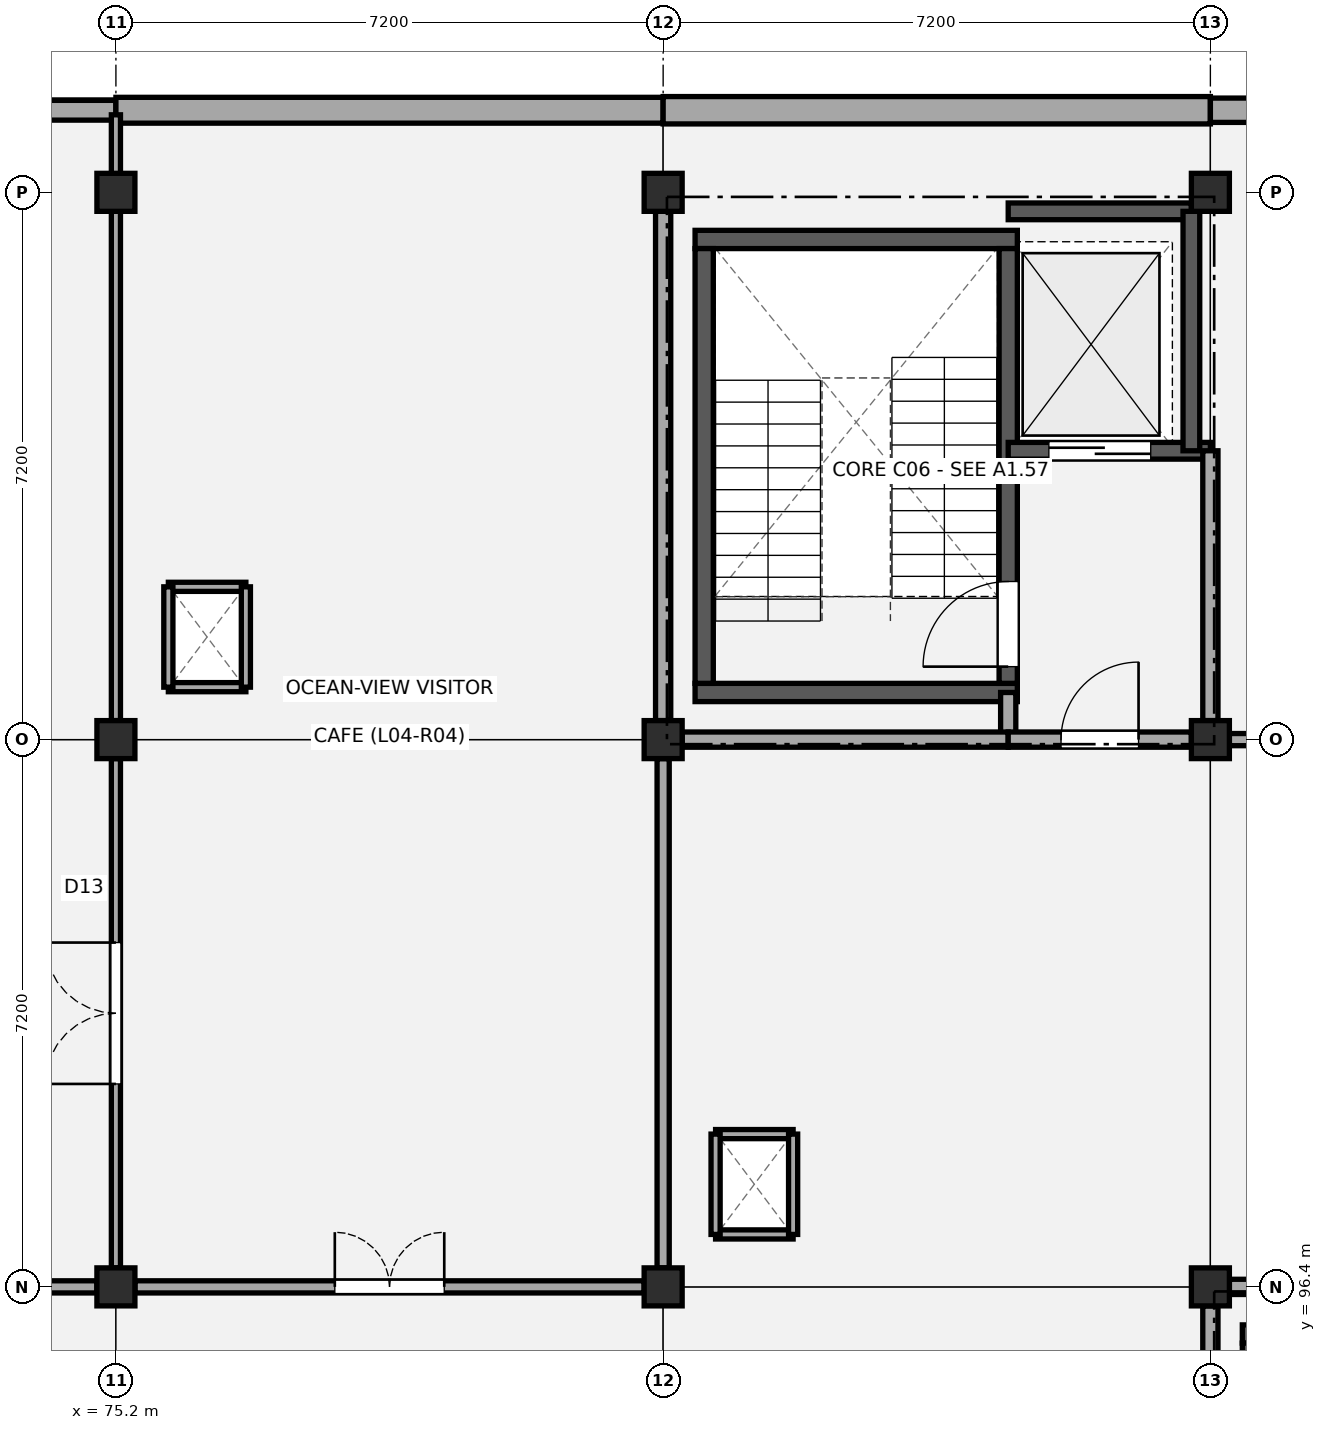
"""IFC4 building model, lengths in metres.
Left out: names, types, materials, properties, quantities, classifications, styles, units other than length and angle.
Written with IfcOpenShell. Run it as: python <this file> out.ifc"""

import sys

from ifc_helpers import new_model, si_unit, direction, frame, frame_2d, origin, origin_2d, place, context, subcontext, project, spatial, rectangle, extrude, element, fill, save


model = new_model("IFC4")
c1 = context("Model", 3, precision=1e-05, world=origin(), true_north=direction((0.0, 1.0)))
c2 = subcontext(c1, "Body", "Model", "MODEL_VIEW")
j1 = project(units=[si_unit("LENGTHUNIT", "METRE"), si_unit("PLANEANGLEUNIT", "RADIAN")], contexts=[c1])
p1 = place(None, origin())
s1 = spatial("IfcSite", under=j1, at=p1, CompositionType="ELEMENT")
p2 = place(p1, origin())
s2 = spatial("IfcBuilding", under=s1, at=p2, CompositionType="ELEMENT")
p3 = place(p2, frame((0.0, 0.0, 17.64)))
s3 = spatial("IfcBuildingStorey", under=s2, at=p3, CompositionType="ELEMENT", Elevation=17.64)
for number, where, z_axis, x_axis in (
    (1, (75.2, 96.4, 0.0), (0.0, 0.0, 1.0), (1.0, 0.0, 0.0)),
    (2, (75.2, 103.6, 0.0), (0.0, 0.0, 1.0), (1.0, 0.0, 0.0)),
    (3, (75.2, 110.8, 0.0), (0.0, 0.0, 1.0), (1.0, 0.0, 0.0)),
    (4, (82.4, 96.4, 0.0), (0.0, 0.0, 1.0), (1.0, 0.0, 0.0)),
    (5, (82.4, 103.6, 0.0), (0.0, 0.0, 1.0), (1.0, 0.0, 0.0)),
    (6, (82.4, 110.8, 0.0), (0.0, 0.0, 1.0), (1.0, 0.0, 0.0)),
    (7, (89.6, 96.4, 0.0), (0.0, 0.0, 1.0), (1.0, 0.0, 0.0)),
    (8, (89.6, 103.6, 0.0), (0.0, 0.0, 1.0), (1.0, 0.0, 0.0)),
    (9, (89.6, 110.8, 0.0), (0.0, 0.0, 1.0), (1.0, 0.0, 0.0)),
):
    element("IfcColumn", number, at=place(p3, frame(where, z_axis=z_axis, x_axis=x_axis)), inside=s3, PredefinedType="COLUMN", context=c2, shape_type="SweptSolid", body=[
        extrude(rectangle(XDim=0.5, YDim=0.5, at=origin_2d()), origin(), (0.0, 0.0, 1.0), 3.96),
    ])
p4 = place(p3, frame((68.0, 111.88, 0.0), z_axis=(0.0, 0.0, 1.0), x_axis=(1.0, 0.0, 0.0)))
e10 = element("IfcWall", 10, at=p4, inside=s3, PredefinedType="STANDARD", context=c2, shape_type="SweptSolid", body=[
    extrude(rectangle(XDim=7.2, YDim=0.26, at=frame_2d((3.6, 0.0))), origin(), (0.0, 0.0, 1.0), 3.63),
])
p5 = place(p4, frame((1.85, 0.0, 0.95)))
e11 = element("IfcOpeningElement", 11, at=p5, cuts=e10, PredefinedType="OPENING", context=c2, shape_type="SweptSolid", body=[
    extrude(rectangle(XDim=3.5, YDim=1.55, at=frame_2d((1.75, 0.775))), frame((0.0, 0.14, 0.0), z_axis=(0.0, -1.0, 0.0), x_axis=(1.0, 0.0, 0.0)), (0.0, 0.0, 1.0), 0.28),
])
p6 = place(p3, frame((75.2, 111.88, 0.0), z_axis=(0.0, 0.0, 1.0), x_axis=(1.0, 0.0, 0.0)))
e12 = element("IfcWall", 12, at=p6, inside=s3, PredefinedType="STANDARD", context=c2, shape_type="SweptSolid", body=[
    extrude(rectangle(XDim=7.2, YDim=0.34, at=frame_2d((3.6, 0.0))), origin(), (0.0, 0.0, 1.0), 3.63),
])
p7 = place(p3, frame((82.4, 111.88, 0.0), z_axis=(0.0, 0.0, 1.0), x_axis=(1.0, 0.0, 0.0)))
e13 = element("IfcWall", 13, at=p7, inside=s3, PredefinedType="STANDARD", context=c2, shape_type="SweptSolid", body=[
    extrude(rectangle(XDim=7.2, YDim=0.36, at=frame_2d((3.6, 0.0))), origin(), (0.0, 0.0, 1.0), 3.69),
])
p8 = place(p3, frame((89.6, 111.88, 0.0), z_axis=(0.0, 0.0, 1.0), x_axis=(1.0, 0.0, 0.0)))
e14 = element("IfcWall", 14, at=p8, inside=s3, PredefinedType="STANDARD", context=c2, shape_type="SweptSolid", body=[
    extrude(rectangle(XDim=7.2, YDim=0.32, at=frame_2d((3.6, 0.0))), origin(), (0.0, 0.0, 1.0), 3.67),
])
for number, where, z_axis, x_axis in (
    (15, (82.82, 104.22, 0.0), (0.0, 0.0, 1.0), (1.0, 0.0, 0.0)),
    (16, (82.82, 110.18, 0.0), (0.0, 0.0, 1.0), (1.0, 0.0, 0.0)),
):
    element("IfcWall", number, at=place(p3, frame(where, z_axis=z_axis, x_axis=x_axis)), inside=s3, PredefinedType="SHEAR", context=c2, shape_type="SweptSolid", body=[
        extrude(rectangle(XDim=4.24, YDim=0.24, at=frame_2d((2.12, 0.0))), origin(), (0.0, 0.0, 1.0), 3.7),
    ])
p9 = place(p3, frame((82.94, 104.34, 0.0), z_axis=(0.0, 0.0, 1.0), x_axis=(0.0, 1.0, 0.0)))
e17 = element("IfcWall", 17, at=p9, inside=s3, PredefinedType="SHEAR", context=c2, shape_type="SweptSolid", body=[
    extrude(rectangle(XDim=5.72, YDim=0.24, at=frame_2d((2.86, 0.0))), origin(), (0.0, 0.0, 1.0), 3.7),
])
p10 = place(p3, frame((86.94, 104.34, 0.0), z_axis=(0.0, 0.0, 1.0), x_axis=(0.0, 1.0, 0.0)))
e18 = element("IfcWall", 18, at=p10, inside=s3, PredefinedType="SHEAR", context=c2, shape_type="SweptSolid", body=[
    extrude(rectangle(XDim=5.72, YDim=0.24, at=frame_2d((2.86, 0.0))), origin(), (0.0, 0.0, 1.0), 3.7),
])
p11 = place(p10, frame((0.22, 0.0, 0.0)))
e19 = element("IfcOpeningElement", 19, at=p11, cuts=e18, PredefinedType="OPENING", context=c2, shape_type="SweptSolid", body=[
    extrude(rectangle(XDim=1.12, YDim=2.15, at=frame_2d((0.56, 1.075))), frame((0.0, 0.13, 0.0), z_axis=(0.0, -1.0, 0.0), x_axis=(1.0, 0.0, 0.0)), (0.0, 0.0, 1.0), 0.26),
])
p12 = place(p3, frame((86.94, 107.4, 0.0), z_axis=(0.0, 0.0, 1.0), x_axis=(1.0, 0.0, 0.0)))
e20 = element("IfcWall", 20, at=p12, inside=s3, PredefinedType="SHEAR", context=c2, shape_type="SweptSolid", body=[
    extrude(rectangle(XDim=2.66, YDim=0.22, at=frame_2d((1.33, 0.0))), origin(), (0.0, 0.0, 1.0), 3.7),
])
p13 = place(p12, frame((0.535, 0.0, 0.0)))
e21 = element("IfcOpeningElement", 21, at=p13, cuts=e20, PredefinedType="OPENING", context=c2, shape_type="SweptSolid", body=[
    extrude(rectangle(XDim=1.34, YDim=2.15, at=frame_2d((0.67, 1.075))), frame((0.0, 0.12, 0.0), z_axis=(0.0, -1.0, 0.0), x_axis=(1.0, 0.0, 0.0)), (0.0, 0.0, 1.0), 0.24),
])
p14 = place(p3, frame((86.94, 110.55, 0.0), z_axis=(0.0, 0.0, 1.0), x_axis=(1.0, 0.0, 0.0)))
e22 = element("IfcWall", 22, at=p14, inside=s3, PredefinedType="SHEAR", context=c2, shape_type="SweptSolid", body=[
    extrude(rectangle(XDim=2.41, YDim=0.22, at=frame_2d((1.205, 0.0))), origin(), (0.0, 0.0, 1.0), 3.7),
])
p15 = place(p3, frame((89.35, 107.4, 0.0), z_axis=(0.0, 0.0, 1.0), x_axis=(0.0, 1.0, 0.0)))
e23 = element("IfcWall", 23, at=p15, inside=s3, PredefinedType="SHEAR", context=c2, shape_type="SweptSolid", body=[
    extrude(rectangle(XDim=3.15, YDim=0.22, at=frame_2d((1.575, 0.0))), origin(), (0.0, 0.0, 1.0), 3.7),
])
p16 = place(p3, frame((86.94, 103.6, 0.0), z_axis=(0.0, 0.0, 1.0), x_axis=(0.0, 1.0, 0.0)))
e24 = element("IfcWall", 24, at=p16, inside=s3, PredefinedType="PARTITIONING", context=c2, shape_type="SweptSolid", body=[
    extrude(rectangle(XDim=0.62, YDim=0.2, at=frame_2d((0.31, 0.0))), origin(), (0.0, 0.0, 1.0), 3.09),
])
p17 = place(p3, frame((82.4, 103.85, 0.0), z_axis=(0.0, 0.0, 1.0), x_axis=(0.0, 1.0, 0.0)))
e25 = element("IfcWall", 25, at=p17, inside=s3, PredefinedType="PARTITIONING", context=c2, shape_type="SweptSolid", body=[
    extrude(rectangle(XDim=6.7, YDim=0.2, at=frame_2d((3.35, 0.0))), origin(), (0.0, 0.0, 1.0), 2.98),
])
p18 = place(p3, frame((89.6, 103.85, 0.0), z_axis=(0.0, 0.0, 1.0), x_axis=(0.0, 1.0, 0.0)))
e26 = element("IfcWall", 26, at=p18, inside=s3, PredefinedType="PARTITIONING", context=c2, shape_type="SweptSolid", body=[
    extrude(rectangle(XDim=3.55, YDim=0.2, at=frame_2d((1.775, 0.0))), origin(), (0.0, 0.0, 1.0), 3.02),
])
p19 = place(p3, frame((82.65, 103.6, 0.0), z_axis=(0.0, 0.0, 1.0), x_axis=(1.0, 0.0, 0.0)))
e27 = element("IfcWall", 27, at=p19, inside=s3, PredefinedType="PARTITIONING", context=c2, shape_type="SweptSolid", body=[
    extrude(rectangle(XDim=4.29, YDim=0.2, at=frame_2d((2.145, 0.0))), origin(), (0.0, 0.0, 1.0), 3.09),
])
p20 = place(p3, frame((86.94, 103.6, 0.0), z_axis=(0.0, 0.0, 1.0), x_axis=(1.0, 0.0, 0.0)))
e28 = element("IfcWall", 28, at=p20, inside=s3, PredefinedType="PARTITIONING", context=c2, shape_type="SweptSolid", body=[
    extrude(rectangle(XDim=2.41, YDim=0.2, at=frame_2d((1.205, 0.0))), origin(), (0.0, 0.0, 1.0), 3.09),
])
p21 = place(p20, frame((0.695, 0.0, 0.0)))
e29 = element("IfcOpeningElement", 29, at=p21, cuts=e28, PredefinedType="OPENING", context=c2, shape_type="SweptSolid", body=[
    extrude(rectangle(XDim=1.02, YDim=2.15, at=frame_2d((0.51, 1.075))), frame((0.0, 0.11, 0.0), z_axis=(0.0, -1.0, 0.0), x_axis=(1.0, 0.0, 0.0)), (0.0, 0.0, 1.0), 0.22),
])
p22 = place(p3, frame((90.02, 95.78, 0.0), z_axis=(0.0, 0.0, 1.0), x_axis=(1.0, 0.0, 0.0)))
e30 = element("IfcWall", 30, at=p22, inside=s3, PredefinedType="SHEAR", context=c2, shape_type="SweptSolid", body=[
    extrude(rectangle(XDim=4.24, YDim=0.24, at=frame_2d((2.12, 0.0))), origin(), (0.0, 0.0, 1.0), 3.68),
])
p23 = place(p3, frame((90.14, 89.94, 0.0), z_axis=(0.0, 0.0, 1.0), x_axis=(0.0, 1.0, 0.0)))
e31 = element("IfcWall", 31, at=p23, inside=s3, PredefinedType="SHEAR", context=c2, shape_type="SweptSolid", body=[
    extrude(rectangle(XDim=5.72, YDim=0.24, at=frame_2d((2.86, 0.0))), origin(), (0.0, 0.0, 1.0), 3.68),
])
p24 = place(p3, frame((89.6, 89.45, 0.0), z_axis=(0.0, 0.0, 1.0), x_axis=(0.0, 1.0, 0.0)))
e32 = element("IfcWall", 32, at=p24, inside=s3, PredefinedType="PARTITIONING", context=c2, shape_type="SweptSolid", body=[
    extrude(rectangle(XDim=6.7, YDim=0.2, at=frame_2d((3.35, 0.0))), origin(), (0.0, 0.0, 1.0), 3.02),
])
p25 = place(p3, frame((89.85, 96.4, 0.0), z_axis=(0.0, 0.0, 1.0), x_axis=(1.0, 0.0, 0.0)))
e33 = element("IfcWall", 33, at=p25, inside=s3, PredefinedType="PARTITIONING", context=c2, shape_type="SweptSolid", body=[
    extrude(rectangle(XDim=6.7, YDim=0.2, at=frame_2d((3.35, 0.0))), origin(), (0.0, 0.0, 1.0), 3.07),
])
for number, where, z_axis, x_axis in (
    (34, (75.89, 104.29, 0.0), (0.0, 0.0, 1.0), (1.0, 0.0, 0.0)),
    (35, (75.89, 105.61, 0.0), (0.0, 0.0, 1.0), (1.0, 0.0, 0.0)),
):
    element("IfcWall", number, at=place(p3, frame(where, z_axis=z_axis, x_axis=x_axis)), inside=s3, PredefinedType="PARTITIONING", context=c2, shape_type="SweptSolid", body=[
        extrude(rectangle(XDim=1.02, YDim=0.12, at=frame_2d((0.51, 0.0))), origin(), (0.0, 0.0, 1.0), 3.62),
    ])
for number, where, z_axis, x_axis in (
    (36, (75.89, 104.29, 0.0), (0.0, 0.0, 1.0), (0.0, 1.0, 0.0)),
    (37, (76.91, 104.29, 0.0), (0.0, 0.0, 1.0), (0.0, 1.0, 0.0)),
):
    element("IfcWall", number, at=place(p3, frame(where, z_axis=z_axis, x_axis=x_axis)), inside=s3, PredefinedType="PARTITIONING", context=c2, shape_type="SweptSolid", body=[
        extrude(rectangle(XDim=1.32, YDim=0.12, at=frame_2d((0.66, 0.0))), origin(), (0.0, 0.0, 1.0), 3.62),
    ])
for number, where, z_axis, x_axis in (
    (38, (83.09, 97.09, 0.0), (0.0, 0.0, 1.0), (1.0, 0.0, 0.0)),
    (39, (83.09, 98.41, 0.0), (0.0, 0.0, 1.0), (1.0, 0.0, 0.0)),
):
    element("IfcWall", number, at=place(p3, frame(where, z_axis=z_axis, x_axis=x_axis)), inside=s3, PredefinedType="PARTITIONING", context=c2, shape_type="SweptSolid", body=[
        extrude(rectangle(XDim=1.02, YDim=0.12, at=frame_2d((0.51, 0.0))), origin(), (0.0, 0.0, 1.0), 3.68),
    ])
for number, where, z_axis, x_axis in (
    (40, (83.09, 97.09, 0.0), (0.0, 0.0, 1.0), (0.0, 1.0, 0.0)),
    (41, (84.11, 97.09, 0.0), (0.0, 0.0, 1.0), (0.0, 1.0, 0.0)),
):
    element("IfcWall", number, at=place(p3, frame(where, z_axis=z_axis, x_axis=x_axis)), inside=s3, PredefinedType="PARTITIONING", context=c2, shape_type="SweptSolid", body=[
        extrude(rectangle(XDim=1.32, YDim=0.12, at=frame_2d((0.66, 0.0))), origin(), (0.0, 0.0, 1.0), 3.68),
    ])
p26 = place(p3, frame((68.25, 96.4, 0.0), z_axis=(0.0, 0.0, 1.0), x_axis=(1.0, 0.0, 0.0)))
e42 = element("IfcWall", 42, at=p26, inside=s3, PredefinedType="PARTITIONING", context=c2, shape_type="SweptSolid", body=[
    extrude(rectangle(XDim=6.7, YDim=0.16, at=frame_2d((3.35, 0.0))), origin(), (0.0, 0.0, 1.0), 2.98),
])
p27 = place(p26, frame((2.63, 0.0, 0.0)))
e43 = element("IfcOpeningElement", 43, at=p27, cuts=e42, PredefinedType="OPENING", context=c2, shape_type="SweptSolid", body=[
    extrude(rectangle(XDim=1.44, YDim=2.2, at=frame_2d((0.72, 1.1))), frame((0.0, 0.09, 0.0), z_axis=(0.0, -1.0, 0.0), x_axis=(1.0, 0.0, 0.0)), (0.0, 0.0, 1.0), 0.18),
])
p28 = place(p3, frame((75.2, 96.65, 0.0), z_axis=(0.0, 0.0, 1.0), x_axis=(0.0, 1.0, 0.0)))
e44 = element("IfcWall", 44, at=p28, inside=s3, PredefinedType="PARTITIONING", context=c2, shape_type="SweptSolid", body=[
    extrude(rectangle(XDim=6.7, YDim=0.12, at=frame_2d((3.35, 0.0))), origin(), (0.0, 0.0, 1.0), 3.03),
])
p29 = place(p28, frame((2.42, 0.0, 0.0)))
e45 = element("IfcOpeningElement", 45, at=p29, cuts=e44, PredefinedType="OPENING", context=c2, shape_type="SweptSolid", body=[
    extrude(rectangle(XDim=1.86, YDim=2.26, at=frame_2d((0.93, 1.13))), frame((0.0, 0.07, 0.0), z_axis=(0.0, -1.0, 0.0), x_axis=(1.0, 0.0, 0.0)), (0.0, 0.0, 1.0), 0.14),
])
p30 = place(p3, frame((75.2, 103.85, 0.0), z_axis=(0.0, 0.0, 1.0), x_axis=(0.0, 1.0, 0.0)))
e46 = element("IfcWall", 46, at=p30, inside=s3, PredefinedType="PARTITIONING", context=c2, shape_type="SweptSolid", body=[
    extrude(rectangle(XDim=7.97, YDim=0.12, at=frame_2d((3.985, 0.0))), origin(), (0.0, 0.0, 1.0), 2.98),
])
p31 = place(p3, frame((75.45, 96.4, 0.0), z_axis=(0.0, 0.0, 1.0), x_axis=(1.0, 0.0, 0.0)))
e47 = element("IfcWall", 47, at=p31, inside=s3, PredefinedType="PARTITIONING", context=c2, shape_type="SweptSolid", body=[
    extrude(rectangle(XDim=6.7, YDim=0.16, at=frame_2d((3.35, 0.0))), origin(), (0.0, 0.0, 1.0), 3.03),
])
p32 = place(p31, frame((2.63, 0.0, 0.0)))
e48 = element("IfcOpeningElement", 48, at=p32, cuts=e47, PredefinedType="OPENING", context=c2, shape_type="SweptSolid", body=[
    extrude(rectangle(XDim=1.44, YDim=2.2, at=frame_2d((0.72, 1.1))), frame((0.0, 0.09, 0.0), z_axis=(0.0, -1.0, 0.0), x_axis=(1.0, 0.0, 0.0)), (0.0, 0.0, 1.0), 0.18),
])
p33 = place(p3, frame((82.4, 96.65, 0.0), z_axis=(0.0, 0.0, 1.0), x_axis=(0.0, 1.0, 0.0)))
e49 = element("IfcWall", 49, at=p33, inside=s3, PredefinedType="PARTITIONING", context=c2, shape_type="SweptSolid", body=[
    extrude(rectangle(XDim=6.7, YDim=0.16, at=frame_2d((3.35, 0.0))), origin(), (0.0, 0.0, 1.0), 3.03),
])
p34 = place(p3, frame((89.85, 103.6, 0.0), z_axis=(0.0, 0.0, 1.0), x_axis=(1.0, 0.0, 0.0)))
e50 = element("IfcWall", 50, at=p34, inside=s3, PredefinedType="PARTITIONING", context=c2, shape_type="SweptSolid", body=[
    extrude(rectangle(XDim=6.7, YDim=0.16, at=frame_2d((3.35, 0.0))), origin(), (0.0, 0.0, 1.0), 3.02),
])
p35 = place(p34, frame((2.86, 0.0, 0.0)))
e51 = element("IfcOpeningElement", 51, at=p35, cuts=e50, PredefinedType="OPENING", context=c2, shape_type="SweptSolid", body=[
    extrude(rectangle(XDim=0.98, YDim=2.12, at=frame_2d((0.49, 1.06))), frame((0.0, 0.09, 0.0), z_axis=(0.0, -1.0, 0.0), x_axis=(1.0, 0.0, 0.0)), (0.0, 0.0, 1.0), 0.18),
])
p36 = place(p11, origin())
e52 = element("IfcDoor", 52, at=p36, inside=s3, OperationType="SINGLE_SWING_LEFT", PredefinedType="DOOR", context=c2, shape_type="SweptSolid", body=[
    extrude(rectangle(XDim=1.12, YDim=2.15, at=frame_2d((0.56, 1.075))), frame((0.0, 0.025, 0.0), z_axis=(0.0, -1.0, 0.0), x_axis=(1.0, 0.0, 0.0)), (0.0, 0.0, 1.0), 0.05),
])
fill(e19, e52)
p37 = place(p13, origin())
e53 = element("IfcDoor", 53, at=p37, inside=s3, OperationType="DOUBLE_DOOR_SLIDING", PredefinedType="DOOR", context=c2, shape_type="SweptSolid", body=[
    extrude(rectangle(XDim=1.34, YDim=2.15, at=frame_2d((0.67, 1.075))), frame((0.0, 0.025, 0.0), z_axis=(0.0, -1.0, 0.0), x_axis=(1.0, 0.0, 0.0)), (0.0, 0.0, 1.0), 0.05),
])
fill(e21, e53)
p38 = place(p21, origin())
e54 = element("IfcDoor", 54, at=p38, inside=s3, OperationType="SINGLE_SWING_RIGHT", PredefinedType="DOOR", context=c2, shape_type="SweptSolid", body=[
    extrude(rectangle(XDim=1.02, YDim=2.15, at=frame_2d((0.51, 1.075))), frame((0.0, 0.025, 0.0), z_axis=(0.0, -1.0, 0.0), x_axis=(1.0, 0.0, 0.0)), (0.0, 0.0, 1.0), 0.05),
])
fill(e29, e54)
p39 = place(p32, origin())
e55 = element("IfcDoor", 55, at=p39, inside=s3, OperationType="DOUBLE_DOOR_SINGLE_SWING", PredefinedType="DOOR", context=c2, shape_type="SweptSolid", body=[
    extrude(rectangle(XDim=1.44, YDim=2.2, at=frame_2d((0.72, 1.1))), frame((0.0, 0.025, 0.0), z_axis=(0.0, -1.0, 0.0), x_axis=(1.0, 0.0, 0.0)), (0.0, 0.0, 1.0), 0.05),
])
fill(e48, e55)
p40 = place(p29, origin())
e56 = element("IfcDoor", 56, at=p40, inside=s3, OperationType="DOUBLE_DOOR_SINGLE_SWING", PredefinedType="DOOR", context=c2, shape_type="SweptSolid", body=[
    extrude(rectangle(XDim=1.86, YDim=2.26, at=frame_2d((0.93, 1.13))), frame((0.0, 0.025, 0.0), z_axis=(0.0, -1.0, 0.0), x_axis=(1.0, 0.0, 0.0)), (0.0, 0.0, 1.0), 0.05),
])
fill(e45, e56)
save(model, sys.argv[1])
